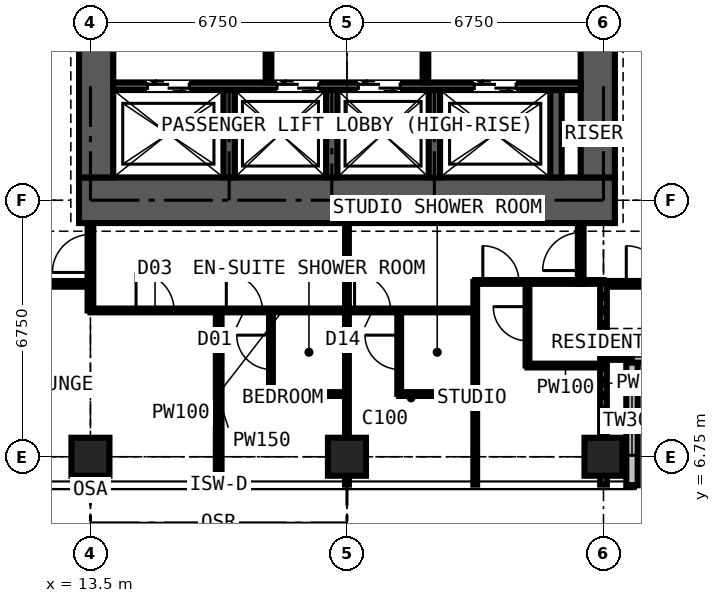
"""IFC4 building model, lengths in metres.
Left out: names, types, materials, properties, quantities, classifications, styles, units other than length and angle.
Written with IfcOpenShell. Run it as: python <this file> out.ifc"""

import sys

from ifc_helpers import new_model, si_unit, direction, frame, frame_2d, origin, origin_2d, place, context, subcontext, project, spatial, rectangle, extrude, element, fill, save


model = new_model("IFC4")
c1 = context("Model", 3, precision=1e-05, world=origin(), true_north=direction((0.0, 1.0)))
c2 = subcontext(c1, "Body", "Model", "MODEL_VIEW")
j1 = project(units=[si_unit("LENGTHUNIT", "METRE"), si_unit("PLANEANGLEUNIT", "RADIAN")], contexts=[c1])
p1 = place(None, origin())
s1 = spatial("IfcSite", under=j1, at=p1, CompositionType="ELEMENT")
p2 = place(p1, origin())
s2 = spatial("IfcBuilding", under=s1, at=p2, CompositionType="ELEMENT")
p3 = place(p2, frame((0.0, 0.0, 236.7)))
s3 = spatial("IfcBuildingStorey", under=s2, at=p3, CompositionType="ELEMENT", Elevation=236.7)
for number, where, z_axis, x_axis in (
    (1, (13.5, 6.75, 0.0), (0.0, 0.0, 1.0), (1.0, 0.0, 0.0)),
    (2, (20.25, 6.75, 0.0), (0.0, 0.0, 1.0), (1.0, 0.0, 0.0)),
    (3, (27.0, 6.75, 0.0), (0.0, 0.0, 1.0), (1.0, 0.0, 0.0)),
):
    element("IfcColumn", number, at=place(p3, frame(where, z_axis=z_axis, x_axis=x_axis)), inside=s3, PredefinedType="COLUMN", context=c2, shape_type="SweptSolid", body=[
        extrude(rectangle(XDim=1.0, YDim=1.0, at=origin_2d()), origin(), (0.0, 0.0, 1.0), 3.6),
    ])
p4 = place(p3, frame((13.2, 13.5, 0.0), z_axis=(0.0, 0.0, 1.0), x_axis=(1.0, 0.0, 0.0)))
e4 = element("IfcWall", 4, at=p4, inside=s3, PredefinedType="SHEAR", context=c2, shape_type="SweptSolid", body=[
    extrude(rectangle(XDim=14.1, YDim=1.2, at=frame_2d((7.05, 0.0))), origin(), (0.0, 0.0, 1.0), 3.6),
])
p5 = place(p3, frame((26.85, 14.1, 0.0), z_axis=(0.0, 0.0, 1.0), x_axis=(0.0, 1.0, 0.0)))
e5 = element("IfcWall", 5, at=p5, inside=s3, PredefinedType="SHEAR", context=c2, shape_type="SweptSolid", body=[
    extrude(rectangle(XDim=12.3, YDim=0.9, at=frame_2d((6.15, 0.0))), origin(), (0.0, 0.0, 1.0), 3.6),
])
p6 = place(p5, frame((3.65, 0.0, 0.0)))
e6 = element("IfcOpeningElement", 6, at=p6, cuts=e5, PredefinedType="OPENING", context=c2, shape_type="SweptSolid", body=[
    extrude(rectangle(XDim=1.2, YDim=2.2, at=frame_2d((0.6, 1.1))), frame((0.0, 0.46, 0.0), z_axis=(0.0, -1.0, 0.0), x_axis=(1.0, 0.0, 0.0)), (0.0, 0.0, 1.0), 0.92),
])
p7 = place(p3, frame((13.65, 26.4, 0.0), z_axis=(0.0, 0.0, 1.0), x_axis=(0.0, -1.0, 0.0)))
e7 = element("IfcWall", 7, at=p7, inside=s3, PredefinedType="SHEAR", context=c2, shape_type="SweptSolid", body=[
    extrude(rectangle(XDim=12.3, YDim=0.9, at=frame_2d((6.15, 0.0))), origin(), (0.0, 0.0, 1.0), 3.6),
])
p8 = place(p7, frame((7.45, 0.0, 0.0)))
e8 = element("IfcOpeningElement", 8, at=p8, cuts=e7, PredefinedType="OPENING", context=c2, shape_type="SweptSolid", body=[
    extrude(rectangle(XDim=1.2, YDim=2.2, at=frame_2d((0.6, 1.1))), frame((0.0, 0.46, 0.0), z_axis=(0.0, -1.0, 0.0), x_axis=(1.0, 0.0, 0.0)), (0.0, 0.0, 1.0), 0.92),
])
p9 = place(p3, frame((27.75, 6.0, 0.0), z_axis=(0.0, 0.0, 1.0), x_axis=(0.0, 1.0, 0.0)))
e9 = element("IfcWall", 9, at=p9, inside=s3, PredefinedType="SOLIDWALL", context=c2, shape_type="SweptSolid", body=[
    extrude(rectangle(XDim=3.375, YDim=0.3, at=frame_2d((1.688, 0.0))), origin(), (0.0, 0.0, 1.0), 3.375),
])
p10 = place(p9, frame((0.788, 0.0, 0.6)))
e10 = element("IfcOpeningElement", 10, at=p10, cuts=e9, PredefinedType="OPENING", context=c2, shape_type="SweptSolid", body=[
    extrude(rectangle(XDim=1.8, YDim=2.1, at=frame_2d((0.9, 1.05))), frame((0.0, 0.16, 0.0), z_axis=(0.0, -1.0, 0.0), x_axis=(1.0, 0.0, 0.0)), (0.0, 0.0, 1.0), 0.32),
])
p11 = place(p3, frame((27.75, 9.375, 0.0), z_axis=(0.0, 0.0, 1.0), x_axis=(1.0, 0.0, 0.0)))
e11 = element("IfcWall", 11, at=p11, inside=s3, PredefinedType="SOLIDWALL", context=c2, shape_type="SweptSolid", body=[
    extrude(rectangle(XDim=3.375, YDim=0.3, at=frame_2d((1.688, 0.0))), origin(), (0.0, 0.0, 1.0), 3.375),
])
p12 = place(p11, frame((0.788, 0.0, 0.6)))
e12 = element("IfcOpeningElement", 12, at=p12, cuts=e11, PredefinedType="OPENING", context=c2, shape_type="SweptSolid", body=[
    extrude(rectangle(XDim=1.8, YDim=2.1, at=frame_2d((0.9, 1.05))), frame((0.0, 0.16, 0.0), z_axis=(0.0, -1.0, 0.0), x_axis=(1.0, 0.0, 0.0)), (0.0, 0.0, 1.0), 0.32),
])
p13 = place(p3, frame((14.1, 16.5, 0.0), z_axis=(0.0, 0.0, 1.0), x_axis=(1.0, 0.0, 0.0)))
e13 = element("IfcWall", 13, at=p13, inside=s3, PredefinedType="SHEAR", context=c2, shape_type="SweptSolid", body=[
    extrude(rectangle(XDim=12.3, YDim=0.2, at=frame_2d((6.15, 0.0))), origin(), (0.0, 0.0, 1.0), 3.6),
])
p14 = place(p13, frame((0.9, 0.0, 0.0)))
e14 = element("IfcOpeningElement", 14, at=p14, cuts=e13, PredefinedType="OPENING", context=c2, shape_type="SweptSolid", body=[
    extrude(rectangle(XDim=1.1, YDim=2.2, at=frame_2d((0.55, 1.1))), frame((0.0, 0.11, 0.0), z_axis=(0.0, -1.0, 0.0), x_axis=(1.0, 0.0, 0.0)), (0.0, 0.0, 1.0), 0.22),
])
p15 = place(p13, frame((4.31, 0.0, 0.0)))
e15 = element("IfcOpeningElement", 15, at=p15, cuts=e13, PredefinedType="OPENING", context=c2, shape_type="SweptSolid", body=[
    extrude(rectangle(XDim=1.1, YDim=2.2, at=frame_2d((0.55, 1.1))), frame((0.0, 0.11, 0.0), z_axis=(0.0, -1.0, 0.0), x_axis=(1.0, 0.0, 0.0)), (0.0, 0.0, 1.0), 0.22),
])
p16 = place(p13, frame((6.45, 0.0, 0.0)))
e16 = element("IfcOpeningElement", 16, at=p16, cuts=e13, PredefinedType="OPENING", context=c2, shape_type="SweptSolid", body=[
    extrude(rectangle(XDim=1.1, YDim=2.2, at=frame_2d((0.55, 1.1))), frame((0.0, 0.11, 0.0), z_axis=(0.0, -1.0, 0.0), x_axis=(1.0, 0.0, 0.0)), (0.0, 0.0, 1.0), 0.22),
])
p17 = place(p13, frame((9.5, 0.0, 0.0)))
e17 = element("IfcOpeningElement", 17, at=p17, cuts=e13, PredefinedType="OPENING", context=c2, shape_type="SweptSolid", body=[
    extrude(rectangle(XDim=1.1, YDim=2.2, at=frame_2d((0.55, 1.1))), frame((0.0, 0.11, 0.0), z_axis=(0.0, -1.0, 0.0), x_axis=(1.0, 0.0, 0.0)), (0.0, 0.0, 1.0), 0.22),
])
for number, where, z_axis, x_axis in (
    (18, (17.15, 14.1, 0.0), (0.0, 0.0, 1.0), (0.0, 1.0, 0.0)),
    (19, (19.85, 14.1, 0.0), (0.0, 0.0, 1.0), (0.0, 1.0, 0.0)),
    (20, (22.55, 14.1, 0.0), (0.0, 0.0, 1.0), (0.0, 1.0, 0.0)),
    (21, (25.75, 14.1, 0.0), (0.0, 0.0, 1.0), (0.0, 1.0, 0.0)),
):
    element("IfcWall", number, at=place(p3, frame(where, z_axis=z_axis, x_axis=x_axis)), inside=s3, PredefinedType="SHEAR", context=c2, shape_type="SweptSolid", body=[
        extrude(rectangle(XDim=2.3, YDim=0.3, at=frame_2d((1.15, 0.0))), origin(), (0.0, 0.0, 1.0), 3.6),
    ])
p18 = place(p3, frame((18.185, 16.6, 0.0), z_axis=(0.0, 0.0, 1.0), x_axis=(0.0, 1.0, 0.0)))
e22 = element("IfcWall", 22, at=p18, inside=s3, PredefinedType="PARTITIONING", context=c2, shape_type="SweptSolid", body=[
    extrude(rectangle(XDim=3.5, YDim=0.15, at=frame_2d((1.75, 0.0))), origin(), (0.0, 0.0, 1.0), 3.375),
])
p19 = place(p18, frame((1.15, 0.0, 0.0)))
e23 = element("IfcOpeningElement", 23, at=p19, cuts=e22, PredefinedType="OPENING", context=c2, shape_type="SweptSolid", body=[
    extrude(rectangle(XDim=1.2, YDim=2.2, at=frame_2d((0.6, 1.1))), frame((0.0, 0.085, 0.0), z_axis=(0.0, -1.0, 0.0), x_axis=(1.0, 0.0, 0.0)), (0.0, 0.0, 1.0), 0.17),
])
p20 = place(p3, frame((22.315, 16.6, 0.0), z_axis=(0.0, 0.0, 1.0), x_axis=(0.0, 1.0, 0.0)))
e24 = element("IfcWall", 24, at=p20, inside=s3, PredefinedType="PARTITIONING", context=c2, shape_type="SweptSolid", body=[
    extrude(rectangle(XDim=3.5, YDim=0.15, at=frame_2d((1.75, 0.0))), origin(), (0.0, 0.0, 1.0), 3.375),
])
p21 = place(p20, frame((1.15, 0.0, 0.0)))
e25 = element("IfcOpeningElement", 25, at=p21, cuts=e24, PredefinedType="OPENING", context=c2, shape_type="SweptSolid", body=[
    extrude(rectangle(XDim=1.2, YDim=2.2, at=frame_2d((0.6, 1.1))), frame((0.0, 0.085, 0.0), z_axis=(0.0, -1.0, 0.0), x_axis=(1.0, 0.0, 0.0)), (0.0, 0.0, 1.0), 0.17),
])
p22 = place(p3, frame((10.125, 11.3, 0.0), z_axis=(0.0, 0.0, 1.0), x_axis=(1.0, 0.0, 0.0)))
e26 = element("IfcWall", 26, at=p22, inside=s3, PredefinedType="PARTITIONING", context=c2, shape_type="SweptSolid", body=[
    extrude(rectangle(XDim=3.375, YDim=0.15, at=frame_2d((1.688, 0.0))), origin(), (0.0, 0.0, 1.0), 3.375),
])
p23 = place(p3, frame((13.5, 10.6, 0.0), z_axis=(0.0, 0.0, 1.0), x_axis=(0.0, 1.0, 0.0)))
e27 = element("IfcWall", 27, at=p23, inside=s3, PredefinedType="PARTITIONING", context=c2, shape_type="SweptSolid", body=[
    extrude(rectangle(XDim=2.3, YDim=0.15, at=frame_2d((1.15, 0.0))), origin(), (0.0, 0.0, 1.0), 2.877),
])
p24 = place(p23, frame((1.0, 0.0, 0.0)))
e28 = element("IfcOpeningElement", 28, at=p24, cuts=e27, PredefinedType="OPENING", context=c2, shape_type="SweptSolid", body=[
    extrude(rectangle(XDim=1.0, YDim=2.2, at=frame_2d((0.5, 1.1))), frame((0.0, 0.085, 0.0), z_axis=(0.0, -1.0, 0.0), x_axis=(1.0, 0.0, 0.0)), (0.0, 0.0, 1.0), 0.17),
])
p25 = place(p3, frame((13.5, 10.6, 0.0), z_axis=(0.0, 0.0, 1.0), x_axis=(1.0, 0.0, 0.0)))
e29 = element("IfcWall", 29, at=p25, inside=s3, PredefinedType="PARTITIONING", context=c2, shape_type="SweptSolid", body=[
    extrude(rectangle(XDim=10.125, YDim=0.1, at=frame_2d((5.062, 0.0))), origin(), (0.0, 0.0, 1.0), 3.375),
])
p26 = place(p25, frame((1.2, 0.0, 0.0)))
e30 = element("IfcOpeningElement", 30, at=p26, cuts=e29, PredefinedType="OPENING", context=c2, shape_type="SweptSolid", body=[
    extrude(rectangle(XDim=1.0, YDim=2.2, at=frame_2d((0.5, 1.1))), frame((0.0, 0.06, 0.0), z_axis=(0.0, -1.0, 0.0), x_axis=(1.0, 0.0, 0.0)), (0.0, 0.0, 1.0), 0.12),
])
p27 = place(p25, frame((3.575, 0.0, 0.0)))
e31 = element("IfcOpeningElement", 31, at=p27, cuts=e29, PredefinedType="OPENING", context=c2, shape_type="SweptSolid", body=[
    extrude(rectangle(XDim=0.95, YDim=2.2, at=frame_2d((0.475, 1.1))), frame((0.0, 0.06, 0.0), z_axis=(0.0, -1.0, 0.0), x_axis=(1.0, 0.0, 0.0)), (0.0, 0.0, 1.0), 0.12),
])
p28 = place(p25, frame((6.95, 0.0, 0.0)))
e32 = element("IfcOpeningElement", 32, at=p28, cuts=e29, PredefinedType="OPENING", context=c2, shape_type="SweptSolid", body=[
    extrude(rectangle(XDim=0.95, YDim=2.2, at=frame_2d((0.475, 1.1))), frame((0.0, 0.06, 0.0), z_axis=(0.0, -1.0, 0.0), x_axis=(1.0, 0.0, 0.0)), (0.0, 0.0, 1.0), 0.12),
])
p29 = place(p3, frame((16.875, 6.016, 0.0), z_axis=(0.0, 0.0, 1.0), x_axis=(0.0, 1.0, 0.0)))
e33 = element("IfcWall", 33, at=p29, inside=s3, PredefinedType="PARTITIONING", context=c2, shape_type="SweptSolid", body=[
    extrude(rectangle(XDim=4.584, YDim=0.15, at=frame_2d((2.292, 0.0))), origin(), (0.0, 0.0, 1.0), 3.375),
])
p30 = place(p3, frame((18.25, 8.4, 0.0), z_axis=(0.0, 0.0, 1.0), x_axis=(0.0, 1.0, 0.0)))
e34 = element("IfcWall", 34, at=p30, inside=s3, PredefinedType="PARTITIONING", context=c2, shape_type="SweptSolid", body=[
    extrude(rectangle(XDim=2.2, YDim=0.1, at=frame_2d((1.1, 0.0))), origin(), (0.0, 0.0, 1.0), 3.375),
])
p31 = place(p30, frame((0.65, 0.0, 0.0)))
e35 = element("IfcOpeningElement", 35, at=p31, cuts=e34, PredefinedType="OPENING", context=c2, shape_type="SweptSolid", body=[
    extrude(rectangle(XDim=0.9, YDim=2.2, at=frame_2d((0.45, 1.1))), frame((0.0, 0.06, 0.0), z_axis=(0.0, -1.0, 0.0), x_axis=(1.0, 0.0, 0.0)), (0.0, 0.0, 1.0), 0.12),
])
p32 = place(p3, frame((18.25, 8.4, 0.0), z_axis=(0.0, 0.0, 1.0), x_axis=(1.0, 0.0, 0.0)))
e36 = element("IfcWall", 36, at=p32, inside=s3, PredefinedType="PARTITIONING", context=c2, shape_type="SweptSolid", body=[
    extrude(rectangle(XDim=2.0, YDim=0.1, at=frame_2d((1.0, 0.0))), origin(), (0.0, 0.0, 1.0), 3.375),
])
p33 = place(p3, frame((20.25, 6.016, 0.0), z_axis=(0.0, 0.0, 1.0), x_axis=(0.0, 1.0, 0.0)))
e37 = element("IfcWall", 37, at=p33, inside=s3, PredefinedType="PARTITIONING", context=c2, shape_type="SweptSolid", body=[
    extrude(rectangle(XDim=6.884, YDim=0.1, at=frame_2d((3.442, 0.0))), origin(), (0.0, 0.0, 1.0), 2.61),
])
p34 = place(p3, frame((21.625, 8.4, 0.0), z_axis=(0.0, 0.0, 1.0), x_axis=(0.0, 1.0, 0.0)))
e38 = element("IfcWall", 38, at=p34, inside=s3, PredefinedType="PARTITIONING", context=c2, shape_type="SweptSolid", body=[
    extrude(rectangle(XDim=2.2, YDim=0.1, at=frame_2d((1.1, 0.0))), origin(), (0.0, 0.0, 1.0), 3.375),
])
p35 = place(p34, frame((0.65, 0.0, 0.0)))
e39 = element("IfcOpeningElement", 39, at=p35, cuts=e38, PredefinedType="OPENING", context=c2, shape_type="SweptSolid", body=[
    extrude(rectangle(XDim=0.9, YDim=2.2, at=frame_2d((0.45, 1.1))), frame((0.0, 0.06, 0.0), z_axis=(0.0, -1.0, 0.0), x_axis=(1.0, 0.0, 0.0)), (0.0, 0.0, 1.0), 0.12),
])
p36 = place(p3, frame((21.625, 8.4, 0.0), z_axis=(0.0, 0.0, 1.0), x_axis=(1.0, 0.0, 0.0)))
e40 = element("IfcWall", 40, at=p36, inside=s3, PredefinedType="PARTITIONING", context=c2, shape_type="SweptSolid", body=[
    extrude(rectangle(XDim=2.0, YDim=0.1, at=frame_2d((1.0, 0.0))), origin(), (0.0, 0.0, 1.0), 3.375),
])
p37 = place(p3, frame((23.625, 6.016, 0.0), z_axis=(0.0, 0.0, 1.0), x_axis=(0.0, 1.0, 0.0)))
e41 = element("IfcWall", 41, at=p37, inside=s3, PredefinedType="PARTITIONING", context=c2, shape_type="SweptSolid", body=[
    extrude(rectangle(XDim=5.334, YDim=0.1, at=frame_2d((2.667, 0.0))), origin(), (0.0, 0.0, 1.0), 3.375),
])
p38 = place(p3, frame((23.625, 11.35, 0.0), z_axis=(0.0, 0.0, 1.0), x_axis=(1.0, 0.0, 0.0)))
e42 = element("IfcWall", 42, at=p38, inside=s3, PredefinedType="PARTITIONING", context=c2, shape_type="SweptSolid", body=[
    extrude(rectangle(XDim=3.375, YDim=0.1, at=frame_2d((1.688, 0.0))), origin(), (0.0, 0.0, 1.0), 3.375),
])
p39 = place(p38, frame((0.2, 0.0, 0.0)))
e43 = element("IfcOpeningElement", 43, at=p39, cuts=e42, PredefinedType="OPENING", context=c2, shape_type="SweptSolid", body=[
    extrude(rectangle(XDim=0.95, YDim=2.2, at=frame_2d((0.475, 1.1))), frame((0.0, 0.06, 0.0), z_axis=(0.0, -1.0, 0.0), x_axis=(1.0, 0.0, 0.0)), (0.0, 0.0, 1.0), 0.12),
])
p40 = place(p3, frame((25.0, 9.15, 0.0), z_axis=(0.0, 0.0, 1.0), x_axis=(0.0, 1.0, 0.0)))
e44 = element("IfcWall", 44, at=p40, inside=s3, PredefinedType="PARTITIONING", context=c2, shape_type="SweptSolid", body=[
    extrude(rectangle(XDim=2.2, YDim=0.1, at=frame_2d((1.1, 0.0))), origin(), (0.0, 0.0, 1.0), 3.375),
])
p41 = place(p40, frame((0.65, 0.0, 0.0)))
e45 = element("IfcOpeningElement", 45, at=p41, cuts=e44, PredefinedType="OPENING", context=c2, shape_type="SweptSolid", body=[
    extrude(rectangle(XDim=0.9, YDim=2.2, at=frame_2d((0.45, 1.1))), frame((0.0, 0.06, 0.0), z_axis=(0.0, -1.0, 0.0), x_axis=(1.0, 0.0, 0.0)), (0.0, 0.0, 1.0), 0.12),
])
p42 = place(p3, frame((25.0, 9.15, 0.0), z_axis=(0.0, 0.0, 1.0), x_axis=(1.0, 0.0, 0.0)))
e46 = element("IfcWall", 46, at=p42, inside=s3, PredefinedType="PARTITIONING", context=c2, shape_type="SweptSolid", body=[
    extrude(rectangle(XDim=2.0, YDim=0.1, at=frame_2d((1.0, 0.0))), origin(), (0.0, 0.0, 1.0), 3.375),
])
p43 = place(p3, frame((26.4, 11.3, 0.0), z_axis=(0.0, 0.0, 1.0), x_axis=(0.0, 1.0, 0.0)))
e47 = element("IfcWall", 47, at=p43, inside=s3, PredefinedType="PARTITIONING", context=c2, shape_type="SweptSolid", body=[
    extrude(rectangle(XDim=1.6, YDim=0.15, at=frame_2d((0.8, 0.0))), origin(), (0.0, 0.0, 1.0), 3.375),
])
p44 = place(p43, frame((0.35, 0.0, 0.0)))
e48 = element("IfcOpeningElement", 48, at=p44, cuts=e47, PredefinedType="OPENING", context=c2, shape_type="SweptSolid", body=[
    extrude(rectangle(XDim=1.0, YDim=2.2, at=frame_2d((0.5, 1.1))), frame((0.0, 0.085, 0.0), z_axis=(0.0, -1.0, 0.0), x_axis=(1.0, 0.0, 0.0)), (0.0, 0.0, 1.0), 0.17),
])
p45 = place(p3, frame((27.0, 11.3, 0.0), z_axis=(0.0, 0.0, 1.0), x_axis=(1.0, 0.0, 0.0)))
e49 = element("IfcWall", 49, at=p45, inside=s3, PredefinedType="PARTITIONING", context=c2, shape_type="SweptSolid", body=[
    extrude(rectangle(XDim=3.375, YDim=0.15, at=frame_2d((1.688, 0.0))), origin(), (0.0, 0.0, 1.0), 3.375),
])
p46 = place(p45, frame((0.6, 0.0, 0.0)))
e50 = element("IfcOpeningElement", 50, at=p46, cuts=e49, PredefinedType="OPENING", context=c2, shape_type="SweptSolid", body=[
    extrude(rectangle(XDim=1.0, YDim=2.2, at=frame_2d((0.5, 1.1))), frame((0.0, 0.085, 0.0), z_axis=(0.0, -1.0, 0.0), x_axis=(1.0, 0.0, 0.0)), (0.0, 0.0, 1.0), 0.17),
])
p47 = place(p3, frame((27.0, 6.016, 0.0), z_axis=(0.0, 0.0, 1.0), x_axis=(0.0, 1.0, 0.0)))
e51 = element("IfcWall", 51, at=p47, inside=s3, PredefinedType="PARTITIONING", context=c2, shape_type="SweptSolid", body=[
    extrude(rectangle(XDim=5.334, YDim=0.175, at=frame_2d((2.667, 0.0))), origin(), (0.0, 0.0, 1.0), 2.877),
])
p48 = place(p3, frame((27.0, 9.375, 0.0), z_axis=(0.0, 0.0, 1.0), x_axis=(1.0, 0.0, 0.0)))
e52 = element("IfcWall", 52, at=p48, inside=s3, PredefinedType="PARTITIONING", context=c2, shape_type="SweptSolid", body=[
    extrude(rectangle(XDim=0.734, YDim=0.15, at=frame_2d((0.367, 0.0))), origin(), (0.0, 0.0, 1.0), 3.375),
])
p49 = place(p10, origin())
e53 = element("IfcWindow", 53, at=p49, inside=s3, PartitioningType="SINGLE_PANEL", PredefinedType="WINDOW", context=c2, shape_type="SweptSolid", body=[
    extrude(rectangle(XDim=1.8, YDim=2.1, at=frame_2d((0.9, 1.05))), frame((0.0, 0.03, 0.0), z_axis=(0.0, -1.0, 0.0), x_axis=(1.0, 0.0, 0.0)), (0.0, 0.0, 1.0), 0.06),
])
fill(e10, e53)
p50 = place(p14, origin())
e54 = element("IfcDoor", 54, at=p50, inside=s3, OperationType="DOUBLE_DOOR_SLIDING", PredefinedType="DOOR", context=c2, shape_type="SweptSolid", body=[
    extrude(rectangle(XDim=1.1, YDim=2.2, at=frame_2d((0.55, 1.1))), frame((0.0, 0.025, 0.0), z_axis=(0.0, -1.0, 0.0), x_axis=(1.0, 0.0, 0.0)), (0.0, 0.0, 1.0), 0.05),
])
fill(e14, e54)
p51 = place(p15, origin())
e55 = element("IfcDoor", 55, at=p51, inside=s3, OperationType="DOUBLE_DOOR_SLIDING", PredefinedType="DOOR", context=c2, shape_type="SweptSolid", body=[
    extrude(rectangle(XDim=1.1, YDim=2.2, at=frame_2d((0.55, 1.1))), frame((0.0, 0.025, 0.0), z_axis=(0.0, -1.0, 0.0), x_axis=(1.0, 0.0, 0.0)), (0.0, 0.0, 1.0), 0.05),
])
fill(e15, e55)
p52 = place(p16, origin())
e56 = element("IfcDoor", 56, at=p52, inside=s3, OperationType="DOUBLE_DOOR_SLIDING", PredefinedType="DOOR", context=c2, shape_type="SweptSolid", body=[
    extrude(rectangle(XDim=1.1, YDim=2.2, at=frame_2d((0.55, 1.1))), frame((0.0, 0.025, 0.0), z_axis=(0.0, -1.0, 0.0), x_axis=(1.0, 0.0, 0.0)), (0.0, 0.0, 1.0), 0.05),
])
fill(e16, e56)
p53 = place(p17, origin())
e57 = element("IfcDoor", 57, at=p53, inside=s3, OperationType="DOUBLE_DOOR_SLIDING", PredefinedType="DOOR", context=c2, shape_type="SweptSolid", body=[
    extrude(rectangle(XDim=1.1, YDim=2.2, at=frame_2d((0.55, 1.1))), frame((0.0, 0.025, 0.0), z_axis=(0.0, -1.0, 0.0), x_axis=(1.0, 0.0, 0.0)), (0.0, 0.0, 1.0), 0.05),
])
fill(e17, e57)
p54 = place(p26, origin())
e58 = element("IfcDoor", 58, at=p54, inside=s3, OperationType="SINGLE_SWING_LEFT", PredefinedType="DOOR", context=c2, shape_type="SweptSolid", body=[
    extrude(rectangle(XDim=1.0, YDim=2.2, at=frame_2d((0.5, 1.1))), frame((0.0, 0.025, 0.0), z_axis=(0.0, -1.0, 0.0), x_axis=(1.0, 0.0, 0.0)), (0.0, 0.0, 1.0), 0.05),
])
fill(e30, e58)
p55 = place(p27, origin())
e59 = element("IfcDoor", 59, at=p55, inside=s3, OperationType="SINGLE_SWING_LEFT", PredefinedType="DOOR", context=c2, shape_type="SweptSolid", body=[
    extrude(rectangle(XDim=0.95, YDim=2.2, at=frame_2d((0.475, 1.1))), frame((0.0, 0.025, 0.0), z_axis=(0.0, -1.0, 0.0), x_axis=(1.0, 0.0, 0.0)), (0.0, 0.0, 1.0), 0.05),
])
fill(e31, e59)
p56 = place(p31, origin())
e60 = element("IfcDoor", 60, at=p56, inside=s3, OperationType="SINGLE_SWING_RIGHT", PredefinedType="DOOR", context=c2, shape_type="SweptSolid", body=[
    extrude(rectangle(XDim=0.9, YDim=2.2, at=frame_2d((0.45, 1.1))), frame((0.0, 0.025, 0.0), z_axis=(0.0, -1.0, 0.0), x_axis=(1.0, 0.0, 0.0)), (0.0, 0.0, 1.0), 0.05),
])
fill(e35, e60)
p57 = place(p24, origin())
e61 = element("IfcDoor", 61, at=p57, inside=s3, OperationType="SINGLE_SWING_LEFT", PredefinedType="DOOR", context=c2, shape_type="SweptSolid", body=[
    extrude(rectangle(XDim=1.0, YDim=2.2, at=frame_2d((0.5, 1.1))), frame((0.0, 0.025, 0.0), z_axis=(0.0, -1.0, 0.0), x_axis=(1.0, 0.0, 0.0)), (0.0, 0.0, 1.0), 0.05),
])
fill(e28, e61)
p58 = place(p28, origin())
e62 = element("IfcDoor", 62, at=p58, inside=s3, OperationType="SINGLE_SWING_LEFT", PredefinedType="DOOR", context=c2, shape_type="SweptSolid", body=[
    extrude(rectangle(XDim=0.95, YDim=2.2, at=frame_2d((0.475, 1.1))), frame((0.0, 0.025, 0.0), z_axis=(0.0, -1.0, 0.0), x_axis=(1.0, 0.0, 0.0)), (0.0, 0.0, 1.0), 0.05),
])
fill(e32, e62)
p59 = place(p35, origin())
e63 = element("IfcDoor", 63, at=p59, inside=s3, OperationType="SINGLE_SWING_RIGHT", PredefinedType="DOOR", context=c2, shape_type="SweptSolid", body=[
    extrude(rectangle(XDim=0.9, YDim=2.2, at=frame_2d((0.45, 1.1))), frame((0.0, 0.025, 0.0), z_axis=(0.0, -1.0, 0.0), x_axis=(1.0, 0.0, 0.0)), (0.0, 0.0, 1.0), 0.05),
])
fill(e39, e63)
p60 = place(p39, origin())
e64 = element("IfcDoor", 64, at=p60, inside=s3, OperationType="SINGLE_SWING_LEFT", PredefinedType="DOOR", context=c2, shape_type="SweptSolid", body=[
    extrude(rectangle(XDim=0.95, YDim=2.2, at=frame_2d((0.475, 1.1))), frame((0.0, 0.025, 0.0), z_axis=(0.0, -1.0, 0.0), x_axis=(1.0, 0.0, 0.0)), (0.0, 0.0, 1.0), 0.05),
])
fill(e43, e64)
p61 = place(p41, origin())
e65 = element("IfcDoor", 65, at=p61, inside=s3, OperationType="SINGLE_SWING_RIGHT", PredefinedType="DOOR", context=c2, shape_type="SweptSolid", body=[
    extrude(rectangle(XDim=0.9, YDim=2.2, at=frame_2d((0.45, 1.1))), frame((0.0, 0.025, 0.0), z_axis=(0.0, -1.0, 0.0), x_axis=(1.0, 0.0, 0.0)), (0.0, 0.0, 1.0), 0.05),
])
fill(e45, e65)
p62 = place(p46, origin())
e66 = element("IfcDoor", 66, at=p62, inside=s3, OperationType="SINGLE_SWING_LEFT", PredefinedType="DOOR", context=c2, shape_type="SweptSolid", body=[
    extrude(rectangle(XDim=1.0, YDim=2.2, at=frame_2d((0.5, 1.1))), frame((0.0, 0.025, 0.0), z_axis=(0.0, -1.0, 0.0), x_axis=(1.0, 0.0, 0.0)), (0.0, 0.0, 1.0), 0.05),
])
fill(e50, e66)
p63 = place(p44, origin())
e67 = element("IfcDoor", 67, at=p63, inside=s3, OperationType="SINGLE_SWING_LEFT", PredefinedType="DOOR", context=c2, shape_type="SweptSolid", body=[
    extrude(rectangle(XDim=1.0, YDim=2.2, at=frame_2d((0.5, 1.1))), frame((0.0, 0.025, 0.0), z_axis=(0.0, -1.0, 0.0), x_axis=(1.0, 0.0, 0.0)), (0.0, 0.0, 1.0), 0.05),
])
fill(e48, e67)
save(model, sys.argv[1])
